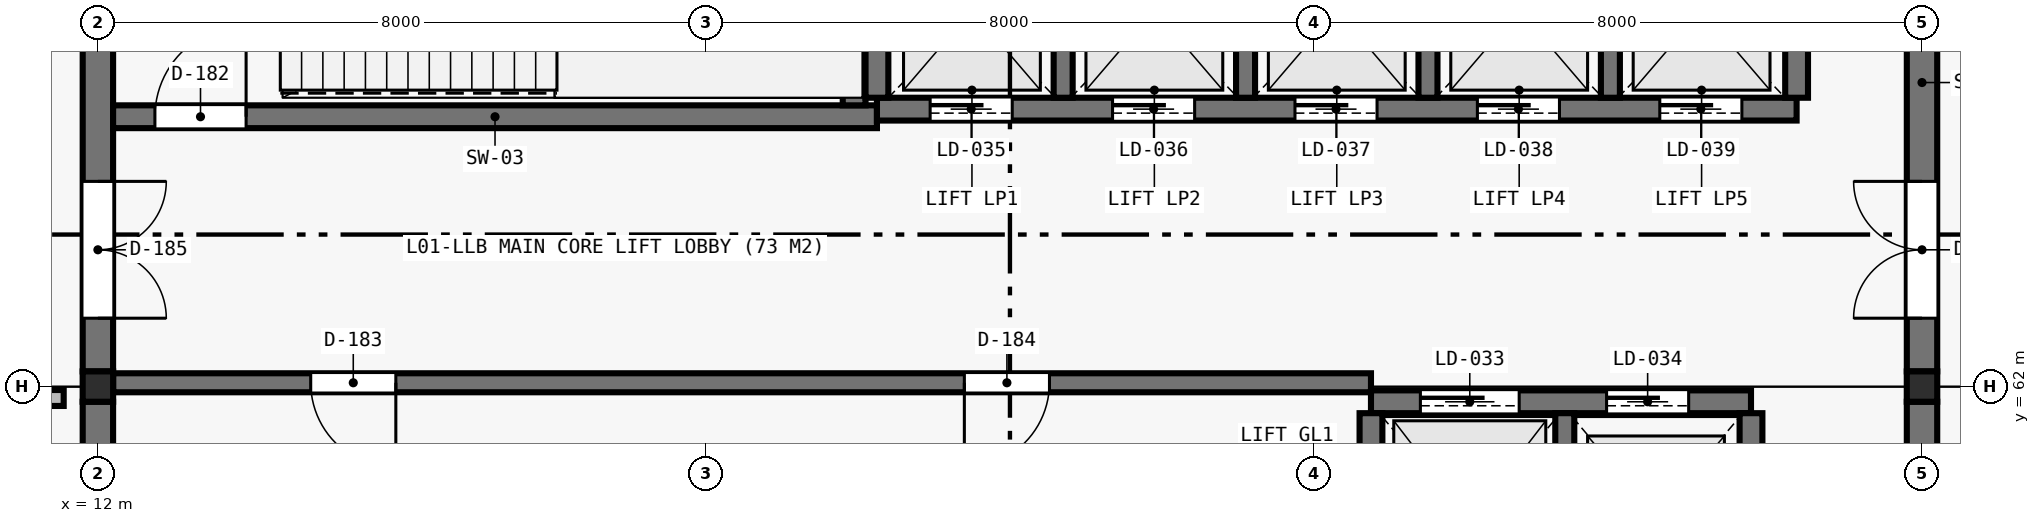
"""IFC4 building model, lengths in metres.
Left out: names, types, materials, properties, quantities, classifications, styles, units other than length and angle.
Written with IfcOpenShell. Run it as: python <this file> out.ifc"""

import sys

from ifc_helpers import new_model, si_unit, direction, frame, frame_2d, origin, origin_2d, place, context, subcontext, project, spatial, rectangle, i_section, extrude, element, fill, save


model = new_model("IFC4")
c1 = context("Model", 3, precision=1e-05, world=origin(), true_north=direction((0.0, 1.0)))
c2 = subcontext(c1, "Body", "Model", "MODEL_VIEW")
j1 = project(units=[si_unit("LENGTHUNIT", "METRE"), si_unit("PLANEANGLEUNIT", "RADIAN")], contexts=[c1])
p1 = place(None, origin())
s1 = spatial("IfcSite", under=j1, at=p1, CompositionType="ELEMENT")
p2 = place(p1, origin())
s2 = spatial("IfcBuilding", under=s1, at=p2, CompositionType="ELEMENT")
p3 = place(p2, frame((0.0, 0.0, 6.3)))
s3 = spatial("IfcBuildingStorey", under=s2, at=p3, CompositionType="ELEMENT", Elevation=6.3)
for number, where, z_axis, x_axis in (
    (1, (12.0, 62.0, 0.0), (0.0, 0.0, 1.0), (1.0, 0.0, 0.0)),
    (2, (36.0, 62.0, 0.0), (0.0, 0.0, 1.0), (1.0, 0.0, 0.0)),
):
    element("IfcColumn", number, at=place(p3, frame(where, z_axis=z_axis, x_axis=x_axis)), inside=s3, PredefinedType="COLUMN", context=c2, shape_type="SweptSolid", body=[
        extrude(i_section(OverallWidth=0.401, OverallDepth=0.399, WebThickness=0.025, FlangeThickness=0.04, at=origin_2d()), origin(), (0.0, 0.0, 1.0), 4.6),
    ])
p4 = place(p3, frame((12.0, 54.199, 0.0), z_axis=(0.0, 0.0, 1.0), x_axis=(0.0, 1.0, 0.0)))
e3 = element("IfcWall", 3, at=p4, inside=s3, PredefinedType="SHEAR", context=c2, shape_type="SweptSolid", body=[
    extrude(rectangle(XDim=7.601, YDim=0.4, at=frame_2d((3.801, 0.0))), origin(), (0.0, 0.0, 1.0), 4.6),
])
p5 = place(p3, frame((12.0, 62.199, 0.0), z_axis=(0.0, 0.0, 1.0), x_axis=(0.0, 1.0, 0.0)))
e4 = element("IfcWall", 4, at=p5, inside=s3, PredefinedType="SHEAR", context=c2, shape_type="SweptSolid", body=[
    extrude(rectangle(XDim=7.601, YDim=0.4, at=frame_2d((3.801, 0.0))), origin(), (0.0, 0.0, 1.0), 4.6),
])
p6 = place(p5, frame((0.7, 0.0, 0.0)))
e5 = element("IfcOpeningElement", 5, at=p6, cuts=e4, PredefinedType="OPENING", context=c2, shape_type="SweptSolid", body=[
    extrude(rectangle(XDim=1.8, YDim=2.2, at=frame_2d((0.9, 1.1))), frame((0.0, 0.21, 0.0), z_axis=(0.0, -1.0, 0.0), x_axis=(1.0, 0.0, 0.0)), (0.0, 0.0, 1.0), 0.42),
])
p7 = place(p3, frame((36.0, 54.199, 0.0), z_axis=(0.0, 0.0, 1.0), x_axis=(0.0, 1.0, 0.0)))
e6 = element("IfcWall", 6, at=p7, inside=s3, PredefinedType="SHEAR", context=c2, shape_type="SweptSolid", body=[
    extrude(rectangle(XDim=7.601, YDim=0.4, at=frame_2d((3.801, 0.0))), origin(), (0.0, 0.0, 1.0), 4.6),
])
p8 = place(p3, frame((36.0, 62.199, 0.0), z_axis=(0.0, 0.0, 1.0), x_axis=(0.0, 1.0, 0.0)))
e7 = element("IfcWall", 7, at=p8, inside=s3, PredefinedType="SHEAR", context=c2, shape_type="SweptSolid", body=[
    extrude(rectangle(XDim=7.601, YDim=0.4, at=frame_2d((3.801, 0.0))), origin(), (0.0, 0.0, 1.0), 4.6),
])
p9 = place(p8, frame((0.7, 0.0, 0.0)))
e8 = element("IfcOpeningElement", 8, at=p9, cuts=e7, PredefinedType="OPENING", context=c2, shape_type="SweptSolid", body=[
    extrude(rectangle(XDim=1.8, YDim=2.2, at=frame_2d((0.9, 1.1))), frame((0.0, 0.21, 0.0), z_axis=(0.0, -1.0, 0.0), x_axis=(1.0, 0.0, 0.0)), (0.0, 0.0, 1.0), 0.42),
])
p10 = place(p3, frame((28.75, 61.8, 0.0), z_axis=(0.0, 0.0, 1.0), x_axis=(1.0, 0.0, 0.0)))
e9 = element("IfcWall", 9, at=p10, inside=s3, PredefinedType="SHEAR", context=c2, shape_type="SweptSolid", body=[
    extrude(rectangle(XDim=5.0, YDim=0.3, at=frame_2d((2.5, 0.0))), origin(), (0.0, 0.0, 1.0), 4.6),
])
p11 = place(p10, frame((0.65, 0.0, 0.0)))
e10 = element("IfcOpeningElement", 10, at=p11, cuts=e9, PredefinedType="OPENING", context=c2, shape_type="SweptSolid", body=[
    extrude(rectangle(XDim=1.3, YDim=2.3, at=frame_2d((0.65, 1.15))), frame((0.0, 0.16, 0.0), z_axis=(0.0, -1.0, 0.0), x_axis=(1.0, 0.0, 0.0)), (0.0, 0.0, 1.0), 0.32),
])
p12 = place(p10, frame((3.1, 0.0, 0.0)))
e11 = element("IfcOpeningElement", 11, at=p12, cuts=e9, PredefinedType="OPENING", context=c2, shape_type="SweptSolid", body=[
    extrude(rectangle(XDim=1.08, YDim=2.2, at=frame_2d((0.54, 1.1))), frame((0.0, 0.16, 0.0), z_axis=(0.0, -1.0, 0.0), x_axis=(1.0, 0.0, 0.0)), (0.0, 0.0, 1.0), 0.32),
])
for number, where, z_axis, x_axis in (
    (12, (28.75, 58.8, 0.0), (0.0, 0.0, 1.0), (0.0, 1.0, 0.0)),
    (13, (33.75, 58.8, 0.0), (0.0, 0.0, 1.0), (0.0, 1.0, 0.0)),
):
    element("IfcWall", number, at=place(p3, frame(where, z_axis=z_axis, x_axis=x_axis)), inside=s3, PredefinedType="SHEAR", context=c2, shape_type="SweptSolid", body=[
        extrude(rectangle(XDim=2.85, YDim=0.3, at=frame_2d((1.425, 0.0))), origin(), (0.0, 0.0, 1.0), 4.6),
    ])
p13 = place(p3, frame((31.3, 58.8, 0.0), z_axis=(0.0, 0.0, 1.0), x_axis=(0.0, 1.0, 0.0)))
e14 = element("IfcWall", 14, at=p13, inside=s3, PredefinedType="SHEAR", context=c2, shape_type="SweptSolid", body=[
    extrude(rectangle(XDim=2.85, YDim=0.25, at=frame_2d((1.425, 0.0))), origin(), (0.0, 0.0, 1.0), 4.6),
])
p14 = place(p3, frame((12.2, 62.05, 0.0), z_axis=(0.0, 0.0, 1.0), x_axis=(1.0, 0.0, 0.0)))
e15 = element("IfcWall", 15, at=p14, inside=s3, PredefinedType="SHEAR", context=c2, shape_type="SweptSolid", body=[
    extrude(rectangle(XDim=16.55, YDim=0.25, at=frame_2d((8.275, 0.0))), origin(), (0.0, 0.0, 1.0), 4.6),
])
p15 = place(p14, frame((2.6, 0.0, 0.0)))
e16 = element("IfcOpeningElement", 16, at=p15, cuts=e15, PredefinedType="OPENING", context=c2, shape_type="SweptSolid", body=[
    extrude(rectangle(XDim=1.12, YDim=2.22, at=frame_2d((0.56, 1.11))), frame((0.0, 0.135, 0.0), z_axis=(0.0, -1.0, 0.0), x_axis=(1.0, 0.0, 0.0)), (0.0, 0.0, 1.0), 0.27),
])
p16 = place(p14, frame((11.2, 0.0, 0.0)))
e17 = element("IfcOpeningElement", 17, at=p16, cuts=e15, PredefinedType="OPENING", context=c2, shape_type="SweptSolid", body=[
    extrude(rectangle(XDim=1.12, YDim=2.22, at=frame_2d((0.56, 1.11))), frame((0.0, 0.135, 0.0), z_axis=(0.0, -1.0, 0.0), x_axis=(1.0, 0.0, 0.0)), (0.0, 0.0, 1.0), 0.27),
])
p17 = place(p3, frame((12.2, 65.55, 0.0), z_axis=(0.0, 0.0, 1.0), x_axis=(1.0, 0.0, 0.0)))
e18 = element("IfcWall", 18, at=p17, inside=s3, PredefinedType="SHEAR", context=c2, shape_type="SweptSolid", body=[
    extrude(rectangle(XDim=10.05, YDim=0.3, at=frame_2d((5.025, 0.0))), origin(), (0.0, 0.0, 1.0), 4.6),
])
p18 = place(p17, frame((0.55, 0.0, 0.0)))
e19 = element("IfcOpeningElement", 19, at=p18, cuts=e18, PredefinedType="OPENING", context=c2, shape_type="SweptSolid", body=[
    extrude(rectangle(XDim=1.2, YDim=2.2, at=frame_2d((0.6, 1.1))), frame((0.0, 0.16, 0.0), z_axis=(0.0, -1.0, 0.0), x_axis=(1.0, 0.0, 0.0)), (0.0, 0.0, 1.0), 0.32),
])
p19 = place(p3, frame((21.95, 65.7, 0.0), z_axis=(0.0, 0.0, 1.0), x_axis=(0.0, 1.0, 0.0)))
e20 = element("IfcWall", 20, at=p19, inside=s3, PredefinedType="SHEAR", context=c2, shape_type="SweptSolid", body=[
    extrude(rectangle(XDim=4.05, YDim=0.3, at=frame_2d((2.025, 0.0))), origin(), (0.0, 0.0, 1.0), 4.6),
])
p20 = place(p3, frame((22.25, 65.65, 0.0), z_axis=(0.0, 0.0, 1.0), x_axis=(1.0, 0.0, 0.0)))
e21 = element("IfcWall", 21, at=p20, inside=s3, PredefinedType="SHEAR", context=c2, shape_type="SweptSolid", body=[
    extrude(rectangle(XDim=12.1, YDim=0.3, at=frame_2d((6.05, 0.0))), origin(), (0.0, 0.0, 1.0), 4.6),
])
p21 = place(p20, frame((0.7, 0.0, 0.0)))
e22 = element("IfcOpeningElement", 22, at=p21, cuts=e21, PredefinedType="OPENING", context=c2, shape_type="SweptSolid", body=[
    extrude(rectangle(XDim=1.08, YDim=2.2, at=frame_2d((0.54, 1.1))), frame((0.0, 0.16, 0.0), z_axis=(0.0, -1.0, 0.0), x_axis=(1.0, 0.0, 0.0)), (0.0, 0.0, 1.0), 0.32),
])
p22 = place(p20, frame((3.1, 0.0, 0.0)))
e23 = element("IfcOpeningElement", 23, at=p22, cuts=e21, PredefinedType="OPENING", context=c2, shape_type="SweptSolid", body=[
    extrude(rectangle(XDim=1.08, YDim=2.2, at=frame_2d((0.54, 1.1))), frame((0.0, 0.16, 0.0), z_axis=(0.0, -1.0, 0.0), x_axis=(1.0, 0.0, 0.0)), (0.0, 0.0, 1.0), 0.32),
])
p23 = place(p20, frame((5.5, 0.0, 0.0)))
e24 = element("IfcOpeningElement", 24, at=p23, cuts=e21, PredefinedType="OPENING", context=c2, shape_type="SweptSolid", body=[
    extrude(rectangle(XDim=1.08, YDim=2.2, at=frame_2d((0.54, 1.1))), frame((0.0, 0.16, 0.0), z_axis=(0.0, -1.0, 0.0), x_axis=(1.0, 0.0, 0.0)), (0.0, 0.0, 1.0), 0.32),
])
p24 = place(p20, frame((7.9, 0.0, 0.0)))
e25 = element("IfcOpeningElement", 25, at=p24, cuts=e21, PredefinedType="OPENING", context=c2, shape_type="SweptSolid", body=[
    extrude(rectangle(XDim=1.08, YDim=2.2, at=frame_2d((0.54, 1.1))), frame((0.0, 0.16, 0.0), z_axis=(0.0, -1.0, 0.0), x_axis=(1.0, 0.0, 0.0)), (0.0, 0.0, 1.0), 0.32),
])
p25 = place(p20, frame((10.3, 0.0, 0.0)))
e26 = element("IfcOpeningElement", 26, at=p25, cuts=e21, PredefinedType="OPENING", context=c2, shape_type="SweptSolid", body=[
    extrude(rectangle(XDim=1.08, YDim=2.2, at=frame_2d((0.54, 1.1))), frame((0.0, 0.16, 0.0), z_axis=(0.0, -1.0, 0.0), x_axis=(1.0, 0.0, 0.0)), (0.0, 0.0, 1.0), 0.32),
])
for number, where, z_axis, x_axis in (
    (27, (22.25, 65.8, 0.0), (0.0, 0.0, 1.0), (0.0, 1.0, 0.0)),
    (28, (34.35, 65.8, 0.0), (0.0, 0.0, 1.0), (0.0, 1.0, 0.0)),
):
    element("IfcWall", number, at=place(p3, frame(where, z_axis=z_axis, x_axis=x_axis)), inside=s3, PredefinedType="SHEAR", context=c2, shape_type="SweptSolid", body=[
        extrude(rectangle(XDim=2.3, YDim=0.3, at=frame_2d((1.15, 0.0))), origin(), (0.0, 0.0, 1.0), 4.6),
    ])
for number, where, z_axis, x_axis in (
    (29, (24.7, 65.8, 0.0), (0.0, 0.0, 1.0), (0.0, 1.0, 0.0)),
    (30, (27.1, 65.8, 0.0), (0.0, 0.0, 1.0), (0.0, 1.0, 0.0)),
    (31, (29.5, 65.8, 0.0), (0.0, 0.0, 1.0), (0.0, 1.0, 0.0)),
    (32, (31.9, 65.8, 0.0), (0.0, 0.0, 1.0), (0.0, 1.0, 0.0)),
):
    element("IfcWall", number, at=place(p3, frame(where, z_axis=z_axis, x_axis=x_axis)), inside=s3, PredefinedType="SHEAR", context=c2, shape_type="SweptSolid", body=[
        extrude(rectangle(XDim=2.3, YDim=0.25, at=frame_2d((1.15, 0.0))), origin(), (0.0, 0.0, 1.0), 4.6),
    ])
p26 = place(p3, frame((6.35, 61.85, 0.0), z_axis=(0.0, 0.0, 1.0), x_axis=(1.0, 0.0, 0.0)))
e33 = element("IfcWall", 33, at=p26, inside=s3, PredefinedType="PLUMBINGWALL", context=c2, shape_type="SweptSolid", body=[
    extrude(rectangle(XDim=5.2, YDim=0.21, at=frame_2d((2.6, 0.0))), origin(), (0.0, 0.0, 1.0), 3.85),
])
p27 = place(p26, frame((0.35, 0.0, 0.0)))
e34 = element("IfcOpeningElement", 34, at=p27, cuts=e33, PredefinedType="OPENING", context=c2, shape_type="SweptSolid", body=[
    extrude(rectangle(XDim=0.95, YDim=2.1, at=frame_2d((0.475, 1.05))), frame((0.0, 0.115, 0.0), z_axis=(0.0, -1.0, 0.0), x_axis=(1.0, 0.0, 0.0)), (0.0, 0.0, 1.0), 0.23),
])
p28 = place(p26, frame((2.1, 0.0, 0.0)))
e35 = element("IfcOpeningElement", 35, at=p28, cuts=e33, PredefinedType="OPENING", context=c2, shape_type="SweptSolid", body=[
    extrude(rectangle(XDim=0.9, YDim=2.1, at=frame_2d((0.45, 1.05))), frame((0.0, 0.115, 0.0), z_axis=(0.0, -1.0, 0.0), x_axis=(1.0, 0.0, 0.0)), (0.0, 0.0, 1.0), 0.23),
])
p29 = place(p26, frame((3.8, 0.0, 0.0)))
e36 = element("IfcOpeningElement", 36, at=p29, cuts=e33, PredefinedType="OPENING", context=c2, shape_type="SweptSolid", body=[
    extrude(rectangle(XDim=0.9, YDim=2.1, at=frame_2d((0.45, 1.05))), frame((0.0, 0.115, 0.0), z_axis=(0.0, -1.0, 0.0), x_axis=(1.0, 0.0, 0.0)), (0.0, 0.0, 1.0), 0.23),
])
p30 = place(p18, origin())
e37 = element("IfcDoor", 37, at=p30, inside=s3, OperationType="SINGLE_SWING_RIGHT", PredefinedType="DOOR", context=c2, shape_type="SweptSolid", body=[
    extrude(rectangle(XDim=1.2, YDim=2.2, at=frame_2d((0.6, 1.1))), frame((0.0, 0.025, 0.0), z_axis=(0.0, -1.0, 0.0), x_axis=(1.0, 0.0, 0.0)), (0.0, 0.0, 1.0), 0.05),
])
fill(e19, e37)
p31 = place(p11, origin())
e38 = element("IfcDoor", 38, at=p31, inside=s3, OperationType="SLIDING_TO_LEFT", PredefinedType="DOOR", context=c2, shape_type="SweptSolid", body=[
    extrude(rectangle(XDim=1.3, YDim=2.3, at=frame_2d((0.65, 1.15))), frame((0.0, 0.025, 0.0), z_axis=(0.0, -1.0, 0.0), x_axis=(1.0, 0.0, 0.0)), (0.0, 0.0, 1.0), 0.05),
])
fill(e10, e38)
p32 = place(p12, origin())
e39 = element("IfcDoor", 39, at=p32, inside=s3, OperationType="SLIDING_TO_LEFT", PredefinedType="DOOR", context=c2, shape_type="SweptSolid", body=[
    extrude(rectangle(XDim=1.08, YDim=2.2, at=frame_2d((0.54, 1.1))), frame((0.0, 0.025, 0.0), z_axis=(0.0, -1.0, 0.0), x_axis=(1.0, 0.0, 0.0)), (0.0, 0.0, 1.0), 0.05),
])
fill(e11, e39)
p33 = place(p21, origin())
e40 = element("IfcDoor", 40, at=p33, inside=s3, OperationType="SLIDING_TO_LEFT", PredefinedType="DOOR", context=c2, shape_type="SweptSolid", body=[
    extrude(rectangle(XDim=1.08, YDim=2.2, at=frame_2d((0.54, 1.1))), frame((0.0, 0.025, 0.0), z_axis=(0.0, -1.0, 0.0), x_axis=(1.0, 0.0, 0.0)), (0.0, 0.0, 1.0), 0.05),
])
fill(e22, e40)
p34 = place(p22, origin())
e41 = element("IfcDoor", 41, at=p34, inside=s3, OperationType="SLIDING_TO_LEFT", PredefinedType="DOOR", context=c2, shape_type="SweptSolid", body=[
    extrude(rectangle(XDim=1.08, YDim=2.2, at=frame_2d((0.54, 1.1))), frame((0.0, 0.025, 0.0), z_axis=(0.0, -1.0, 0.0), x_axis=(1.0, 0.0, 0.0)), (0.0, 0.0, 1.0), 0.05),
])
fill(e23, e41)
p35 = place(p23, origin())
e42 = element("IfcDoor", 42, at=p35, inside=s3, OperationType="SLIDING_TO_LEFT", PredefinedType="DOOR", context=c2, shape_type="SweptSolid", body=[
    extrude(rectangle(XDim=1.08, YDim=2.2, at=frame_2d((0.54, 1.1))), frame((0.0, 0.025, 0.0), z_axis=(0.0, -1.0, 0.0), x_axis=(1.0, 0.0, 0.0)), (0.0, 0.0, 1.0), 0.05),
])
fill(e24, e42)
p36 = place(p24, origin())
e43 = element("IfcDoor", 43, at=p36, inside=s3, OperationType="SLIDING_TO_LEFT", PredefinedType="DOOR", context=c2, shape_type="SweptSolid", body=[
    extrude(rectangle(XDim=1.08, YDim=2.2, at=frame_2d((0.54, 1.1))), frame((0.0, 0.025, 0.0), z_axis=(0.0, -1.0, 0.0), x_axis=(1.0, 0.0, 0.0)), (0.0, 0.0, 1.0), 0.05),
])
fill(e25, e43)
p37 = place(p25, origin())
e44 = element("IfcDoor", 44, at=p37, inside=s3, OperationType="SLIDING_TO_LEFT", PredefinedType="DOOR", context=c2, shape_type="SweptSolid", body=[
    extrude(rectangle(XDim=1.08, YDim=2.2, at=frame_2d((0.54, 1.1))), frame((0.0, 0.025, 0.0), z_axis=(0.0, -1.0, 0.0), x_axis=(1.0, 0.0, 0.0)), (0.0, 0.0, 1.0), 0.05),
])
fill(e26, e44)
p38 = place(p15, frame((1.12, 0.0, 0.0), z_axis=(0.0, 0.0, 1.0), x_axis=(-1.0, 0.0, 0.0)))
e45 = element("IfcDoor", 45, at=p38, inside=s3, OperationType="SINGLE_SWING_LEFT", PredefinedType="DOOR", context=c2, shape_type="SweptSolid", body=[
    extrude(rectangle(XDim=1.12, YDim=2.22, at=frame_2d((0.56, 1.11))), frame((0.0, 0.025, 0.0), z_axis=(0.0, -1.0, 0.0), x_axis=(1.0, 0.0, 0.0)), (0.0, 0.0, 1.0), 0.05),
])
fill(e16, e45)
p39 = place(p16, frame((1.12, 0.0, 0.0), z_axis=(0.0, 0.0, 1.0), x_axis=(-1.0, 0.0, 0.0)))
e46 = element("IfcDoor", 46, at=p39, inside=s3, OperationType="SINGLE_SWING_RIGHT", PredefinedType="DOOR", context=c2, shape_type="SweptSolid", body=[
    extrude(rectangle(XDim=1.12, YDim=2.22, at=frame_2d((0.56, 1.11))), frame((0.0, 0.025, 0.0), z_axis=(0.0, -1.0, 0.0), x_axis=(1.0, 0.0, 0.0)), (0.0, 0.0, 1.0), 0.05),
])
fill(e17, e46)
p40 = place(p6, frame((1.8, 0.0, 0.0), z_axis=(0.0, 0.0, 1.0), x_axis=(-1.0, 0.0, 0.0)))
e47 = element("IfcDoor", 47, at=p40, inside=s3, OperationType="DOUBLE_DOOR_SINGLE_SWING", PredefinedType="DOOR", context=c2, shape_type="SweptSolid", body=[
    extrude(rectangle(XDim=1.8, YDim=2.2, at=frame_2d((0.9, 1.1))), frame((0.0, 0.025, 0.0), z_axis=(0.0, -1.0, 0.0), x_axis=(1.0, 0.0, 0.0)), (0.0, 0.0, 1.0), 0.05),
])
fill(e5, e47)
p41 = place(p9, origin())
e48 = element("IfcDoor", 48, at=p41, inside=s3, OperationType="DOUBLE_DOOR_SINGLE_SWING", PredefinedType="DOOR", context=c2, shape_type="SweptSolid", body=[
    extrude(rectangle(XDim=1.8, YDim=2.2, at=frame_2d((0.9, 1.1))), frame((0.0, 0.025, 0.0), z_axis=(0.0, -1.0, 0.0), x_axis=(1.0, 0.0, 0.0)), (0.0, 0.0, 1.0), 0.05),
])
fill(e8, e48)
save(model, sys.argv[1])
